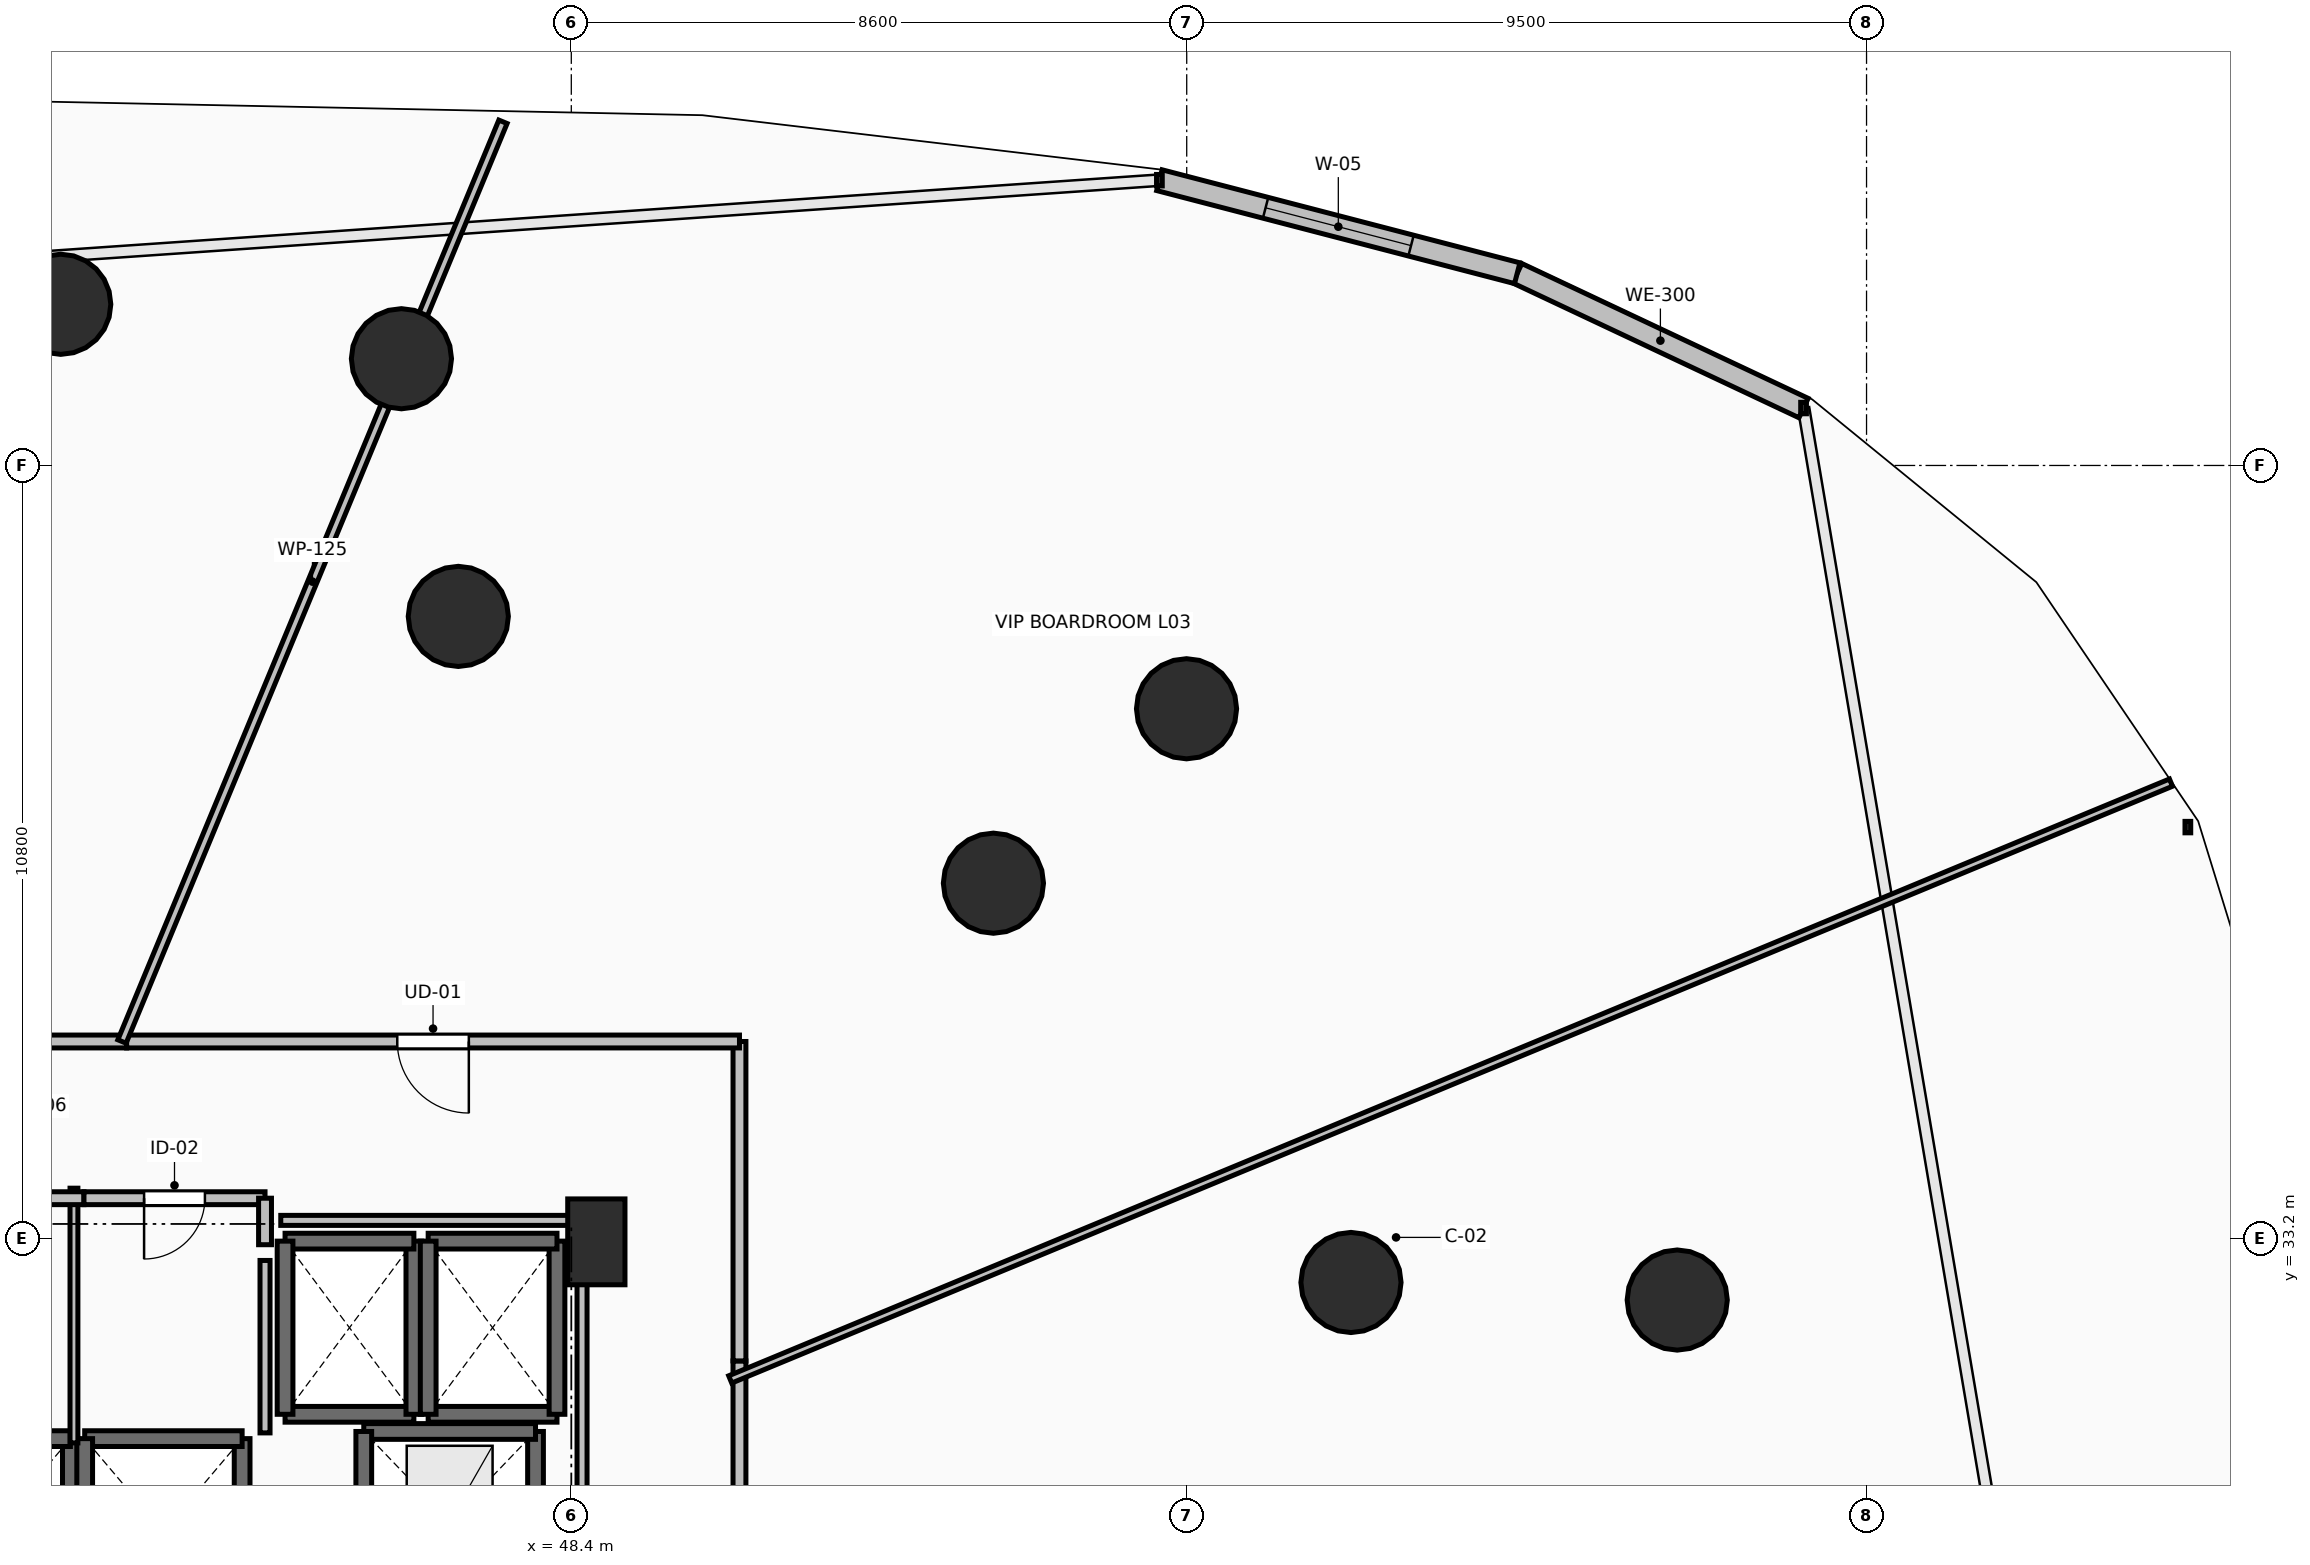
"""IFC4 building model, lengths in metres.
Left out: names, types, materials, properties, quantities, classifications, styles, units other than length and angle.
Written with IfcOpenShell. Run it as: python <this file> out.ifc"""

import sys

from ifc_helpers import new_model, si_unit, direction, frame, frame_2d, origin, origin_2d, place, context, subcontext, project, spatial, rectangle, circle, extrude, element, fill, save


model = new_model("IFC4")
c1 = context("Model", 3, precision=1e-05, world=origin(), true_north=direction((0.0, 1.0)))
c2 = subcontext(c1, "Body", "Model", "MODEL_VIEW")
j1 = project(units=[si_unit("LENGTHUNIT", "METRE"), si_unit("PLANEANGLEUNIT", "RADIAN")], contexts=[c1])
p1 = place(None, origin())
s1 = spatial("IfcSite", under=j1, at=p1, CompositionType="ELEMENT")
p2 = place(p1, origin())
s2 = spatial("IfcBuilding", under=s1, at=p2, CompositionType="ELEMENT")
p3 = place(p2, frame((0.0, 0.0, 14.4)))
s3 = spatial("IfcBuildingStorey", under=s2, at=p3, CompositionType="ELEMENT", Elevation=14.4)
for number, where, z_axis, x_axis in (
    (1, (59.295, 32.582, 0.0), (0.0, 0.0, 1.0), (0.924, 0.383, 0.0)),
    (2, (54.299, 38.162, 0.0), (0.0, 0.0, 1.0), (0.707, 0.707, 0.0)),
    (3, (46.821, 41.891, 0.0), (0.0, 0.0, 1.0), (0.383, 0.924, 0.0)),
    (4, (63.854, 32.337, 0.0), (0.0, 0.0, 1.0), (0.924, 0.383, 0.0)),
    (5, (56.997, 40.6, 0.0), (0.0, 0.0, 1.0), (0.707, 0.707, 0.0)),
    (6, (46.026, 45.492, 0.0), (0.0, 0.0, 1.0), (0.383, 0.924, 0.0)),
    (7, (41.265, 46.252, 0.0), (0.0, 0.0, 1.0), (0.0, 1.0, 0.0)),
):
    element("IfcColumn", number, at=place(p3, frame(where, z_axis=z_axis, x_axis=x_axis)), inside=s3, PredefinedType="COLUMN", context=c2, shape_type="SweptSolid", body=[
        extrude(circle(Radius=0.7, at=origin_2d()), origin(), (0.0, 0.0, 1.0), 4.8),
    ])
p4 = place(p3, frame((48.75, 33.15, 0.0), z_axis=(0.0, 0.0, 1.0), x_axis=(1.0, 0.0, 0.0)))
e8 = element("IfcColumn", 8, at=p4, inside=s3, PredefinedType="PILASTER", context=c2, shape_type="SweptSolid", body=[
    extrude(rectangle(XDim=0.8, YDim=1.2, at=origin_2d()), origin(), (0.0, 0.0, 1.0), 4.8),
])
p5 = place(p3, frame((65.62, 44.802, 0.0), z_axis=(0.0, 0.0, 1.0), x_axis=(-0.904701070817, 0.426046913452, 0.0)))
e9 = element("IfcWall", 9, at=p5, inside=s3, PredefinedType="STANDARD", context=c2, shape_type="SweptSolid", body=[
    extrude(rectangle(XDim=4.423, YDim=0.3, at=frame_2d((2.211, 0.0))), origin(), (0.0, 0.0, 1.0), 4.48),
])
p6 = place(p3, frame((61.619, 46.687, 0.0), z_axis=(0.0, 0.0, 1.0), x_axis=(-0.967814681155, 0.251663948434, 0.0)))
e10 = element("IfcWall", 10, at=p6, inside=s3, PredefinedType="STANDARD", context=c2, shape_type="SweptSolid", body=[
    extrude(rectangle(XDim=5.167, YDim=0.3, at=frame_2d((2.583, 0.0))), origin(), (0.0, 0.0, 1.0), 4.48),
])
p7 = place(p6, frame((1.533, 0.0, 0.85)))
e11 = element("IfcOpeningElement", 11, at=p7, cuts=e10, PredefinedType="OPENING", context=c2, shape_type="SweptSolid", body=[
    extrude(rectangle(XDim=2.1, YDim=2.8, at=frame_2d((1.05, 1.4))), frame((0.0, 0.165, 0.0), z_axis=(0.0, -1.0, 0.0), x_axis=(1.0, 0.0, 0.0)), (0.0, 0.0, 1.0), 0.33),
])
p8 = place(p3, frame((41.4, 27.8, 0.0), z_axis=(0.0, 0.0, 1.0), x_axis=(0.0, 1.0, 0.0)))
e12 = element("IfcWall", 12, at=p8, inside=s3, PredefinedType="SOLIDWALL", context=c2, shape_type="SweptSolid", body=[
    extrude(rectangle(XDim=2.6, YDim=0.22, at=frame_2d((1.3, 0.0))), origin(), (0.0, 0.0, 1.0), 4.48),
])
p9 = place(p3, frame((41.4, 30.4, 0.0), z_axis=(0.0, 0.0, 1.0), x_axis=(-1.0, 0.0, 0.0)))
e13 = element("IfcWall", 13, at=p9, inside=s3, PredefinedType="SOLIDWALL", context=c2, shape_type="SweptSolid", body=[
    extrude(rectangle(XDim=2.2, YDim=0.22, at=frame_2d((1.1, 0.0))), origin(), (0.0, 0.0, 1.0), 4.48),
])
p10 = place(p3, frame((43.8, 27.8, 0.0), z_axis=(0.0, 0.0, 1.0), x_axis=(0.0, 1.0, 0.0)))
e14 = element("IfcWall", 14, at=p10, inside=s3, PredefinedType="SOLIDWALL", context=c2, shape_type="SweptSolid", body=[
    extrude(rectangle(XDim=2.6, YDim=0.22, at=frame_2d((1.3, 0.0))), origin(), (0.0, 0.0, 1.0), 4.48),
])
p11 = place(p3, frame((43.8, 30.4, 0.0), z_axis=(0.0, 0.0, 1.0), x_axis=(-1.0, 0.0, 0.0)))
e15 = element("IfcWall", 15, at=p11, inside=s3, PredefinedType="SOLIDWALL", context=c2, shape_type="SweptSolid", body=[
    extrude(rectangle(XDim=2.2, YDim=0.22, at=frame_2d((1.1, 0.0))), origin(), (0.0, 0.0, 1.0), 4.48),
])
p12 = place(p3, frame((41.6, 30.4, 0.0), z_axis=(0.0, 0.0, 1.0), x_axis=(0.0, -1.0, 0.0)))
e16 = element("IfcWall", 16, at=p12, inside=s3, PredefinedType="SOLIDWALL", context=c2, shape_type="SweptSolid", body=[
    extrude(rectangle(XDim=2.6, YDim=0.22, at=frame_2d((1.3, 0.0))), origin(), (0.0, 0.0, 1.0), 4.48),
])
p13 = place(p3, frame((44.4, 30.74, 0.0), z_axis=(0.0, 0.0, 1.0), x_axis=(1.0, 0.0, 0.0)))
e17 = element("IfcWall", 17, at=p13, inside=s3, PredefinedType="SOLIDWALL", context=c2, shape_type="SweptSolid", body=[
    extrude(rectangle(XDim=1.8, YDim=0.22, at=frame_2d((0.9, 0.0))), origin(), (0.0, 0.0, 1.0), 4.48),
])
p14 = place(p3, frame((46.2, 30.74, 0.0), z_axis=(0.0, 0.0, 1.0), x_axis=(0.0, 1.0, 0.0)))
e18 = element("IfcWall", 18, at=p14, inside=s3, PredefinedType="SOLIDWALL", context=c2, shape_type="SweptSolid", body=[
    extrude(rectangle(XDim=2.42, YDim=0.22, at=frame_2d((1.21, 0.0))), origin(), (0.0, 0.0, 1.0), 4.48),
])
p15 = place(p3, frame((46.2, 33.16, 0.0), z_axis=(0.0, 0.0, 1.0), x_axis=(-1.0, 0.0, 0.0)))
e19 = element("IfcWall", 19, at=p15, inside=s3, PredefinedType="SOLIDWALL", context=c2, shape_type="SweptSolid", body=[
    extrude(rectangle(XDim=1.8, YDim=0.22, at=frame_2d((0.9, 0.0))), origin(), (0.0, 0.0, 1.0), 4.48),
])
p16 = place(p3, frame((44.4, 33.16, 0.0), z_axis=(0.0, 0.0, 1.0), x_axis=(0.0, -1.0, 0.0)))
e20 = element("IfcWall", 20, at=p16, inside=s3, PredefinedType="SOLIDWALL", context=c2, shape_type="SweptSolid", body=[
    extrude(rectangle(XDim=2.42, YDim=0.22, at=frame_2d((1.21, 0.0))), origin(), (0.0, 0.0, 1.0), 4.48),
])
p17 = place(p3, frame((46.4, 30.74, 0.0), z_axis=(0.0, 0.0, 1.0), x_axis=(1.0, 0.0, 0.0)))
e21 = element("IfcWall", 21, at=p17, inside=s3, PredefinedType="SOLIDWALL", context=c2, shape_type="SweptSolid", body=[
    extrude(rectangle(XDim=1.8, YDim=0.22, at=frame_2d((0.9, 0.0))), origin(), (0.0, 0.0, 1.0), 4.48),
])
p18 = place(p3, frame((48.2, 30.74, 0.0), z_axis=(0.0, 0.0, 1.0), x_axis=(0.0, 1.0, 0.0)))
e22 = element("IfcWall", 22, at=p18, inside=s3, PredefinedType="SOLIDWALL", context=c2, shape_type="SweptSolid", body=[
    extrude(rectangle(XDim=2.42, YDim=0.22, at=frame_2d((1.21, 0.0))), origin(), (0.0, 0.0, 1.0), 4.48),
])
p19 = place(p3, frame((48.2, 33.16, 0.0), z_axis=(0.0, 0.0, 1.0), x_axis=(-1.0, 0.0, 0.0)))
e23 = element("IfcWall", 23, at=p19, inside=s3, PredefinedType="SOLIDWALL", context=c2, shape_type="SweptSolid", body=[
    extrude(rectangle(XDim=1.8, YDim=0.22, at=frame_2d((0.9, 0.0))), origin(), (0.0, 0.0, 1.0), 4.48),
])
p20 = place(p3, frame((46.4, 33.16, 0.0), z_axis=(0.0, 0.0, 1.0), x_axis=(0.0, -1.0, 0.0)))
e24 = element("IfcWall", 24, at=p20, inside=s3, PredefinedType="SOLIDWALL", context=c2, shape_type="SweptSolid", body=[
    extrude(rectangle(XDim=2.42, YDim=0.22, at=frame_2d((1.21, 0.0))), origin(), (0.0, 0.0, 1.0), 4.48),
])
p21 = place(p3, frame((47.9, 28.0, 0.0), z_axis=(0.0, 0.0, 1.0), x_axis=(0.0, 1.0, 0.0)))
e25 = element("IfcWall", 25, at=p21, inside=s3, PredefinedType="SHEAR", context=c2, shape_type="SweptSolid", body=[
    extrude(rectangle(XDim=2.5, YDim=0.22, at=frame_2d((1.25, 0.0))), origin(), (0.0, 0.0, 1.0), 4.48),
])
p22 = place(p3, frame((47.9, 30.5, 0.0), z_axis=(0.0, 0.0, 1.0), x_axis=(-1.0, 0.0, 0.0)))
e26 = element("IfcWall", 26, at=p22, inside=s3, PredefinedType="SHEAR", context=c2, shape_type="SweptSolid", body=[
    extrude(rectangle(XDim=2.4, YDim=0.22, at=frame_2d((1.2, 0.0))), origin(), (0.0, 0.0, 1.0), 4.48),
])
p23 = place(p3, frame((45.5, 30.5, 0.0), z_axis=(0.0, 0.0, 1.0), x_axis=(0.0, -1.0, 0.0)))
e27 = element("IfcWall", 27, at=p23, inside=s3, PredefinedType="SHEAR", context=c2, shape_type="SweptSolid", body=[
    extrude(rectangle(XDim=2.5, YDim=0.22, at=frame_2d((1.25, 0.0))), origin(), (0.0, 0.0, 1.0), 4.48),
])
p24 = place(p3, frame((41.45, 30.34, 0.0), z_axis=(0.0, 0.0, 1.0), x_axis=(0.0, 1.0, 0.0)))
e28 = element("IfcWall", 28, at=p24, inside=s3, PredefinedType="PARTITIONING", context=c2, shape_type="SweptSolid", body=[
    extrude(rectangle(XDim=3.56, YDim=0.11, at=frame_2d((1.78, 0.0))), origin(), (0.0, 0.0, 1.0), 4.48),
])
p25 = place(p3, frame((41.59, 33.76, 0.0), z_axis=(0.0, 0.0, 1.0), x_axis=(-1.0, 0.0, 0.0)))
e29 = element("IfcWall", 29, at=p25, inside=s3, PredefinedType="PARTITIONING", context=c2, shape_type="SweptSolid", body=[
    extrude(rectangle(XDim=3.44, YDim=0.18, at=frame_2d((1.72, 0.0))), origin(), (0.0, 0.0, 1.0), 4.48),
])
p26 = place(p25, frame((1.295, 0.0, 0.0)))
e30 = element("IfcOpeningElement", 30, at=p26, cuts=e29, PredefinedType="OPENING", context=c2, shape_type="SweptSolid", body=[
    extrude(rectangle(XDim=0.85, YDim=2.1, at=frame_2d((0.425, 1.05))), frame((0.0, 0.105, 0.0), z_axis=(0.0, -1.0, 0.0), x_axis=(1.0, 0.0, 0.0)), (0.0, 0.0, 1.0), 0.21),
])
p27 = place(p3, frame((44.12, 33.76, 0.0), z_axis=(0.0, 0.0, 1.0), x_axis=(-1.0, 0.0, 0.0)))
e31 = element("IfcWall", 31, at=p27, inside=s3, PredefinedType="PARTITIONING", context=c2, shape_type="SweptSolid", body=[
    extrude(rectangle(XDim=2.53, YDim=0.18, at=frame_2d((1.265, 0.0))), origin(), (0.0, 0.0, 1.0), 4.48),
])
p28 = place(p27, frame((0.84, 0.0, 0.0)))
e32 = element("IfcOpeningElement", 32, at=p28, cuts=e31, PredefinedType="OPENING", context=c2, shape_type="SweptSolid", body=[
    extrude(rectangle(XDim=0.85, YDim=2.1, at=frame_2d((0.425, 1.05))), frame((0.0, 0.105, 0.0), z_axis=(0.0, -1.0, 0.0), x_axis=(1.0, 0.0, 0.0)), (0.0, 0.0, 1.0), 0.21),
])
p29 = place(p3, frame((44.12, 33.11, 0.0), z_axis=(0.0, 0.0, 1.0), x_axis=(0.0, 1.0, 0.0)))
e33 = element("IfcWall", 33, at=p29, inside=s3, PredefinedType="PARTITIONING", context=c2, shape_type="SweptSolid", body=[
    extrude(rectangle(XDim=0.65, YDim=0.18, at=frame_2d((0.325, 0.0))), origin(), (0.0, 0.0, 1.0), 4.48),
])
p30 = place(p3, frame((42.186, 35.95, 0.0), z_axis=(0.0, 0.0, 1.0), x_axis=(-1.0, 0.0, 0.0)))
e34 = element("IfcWall", 34, at=p30, inside=s3, PredefinedType="PARTITIONING", context=c2, shape_type="SweptSolid", body=[
    extrude(rectangle(XDim=16.936, YDim=0.18, at=frame_2d((8.468, 0.0))), origin(), (0.0, 0.0, 1.0), 3.672),
])
p31 = place(p30, frame((7.868, 0.0, 0.0)))
e35 = element("IfcOpeningElement", 35, at=p31, cuts=e34, PredefinedType="OPENING", context=c2, shape_type="SweptSolid", body=[
    extrude(rectangle(XDim=1.2, YDim=2.15, at=frame_2d((0.6, 1.075))), frame((0.0, 0.105, 0.0), z_axis=(0.0, -1.0, 0.0), x_axis=(1.0, 0.0, 0.0)), (0.0, 0.0, 1.0), 0.21),
])
p32 = place(p3, frame((50.75, 13.96, 0.0), z_axis=(0.0, 0.0, 1.0), x_axis=(0.0, 1.0, 0.0)))
e36 = element("IfcWall", 36, at=p32, inside=s3, PredefinedType="PARTITIONING", context=c2, shape_type="SweptSolid", body=[
    extrude(rectangle(XDim=17.526, YDim=0.18, at=frame_2d((8.763, 0.0))), origin(), (0.0, 0.0, 1.0), 3.672),
])
p33 = place(p32, frame((8.263, 0.0, 0.0)))
e37 = element("IfcOpeningElement", 37, at=p33, cuts=e36, PredefinedType="OPENING", context=c2, shape_type="SweptSolid", body=[
    extrude(rectangle(XDim=1.0, YDim=2.15, at=frame_2d((0.5, 1.075))), frame((0.0, 0.105, 0.0), z_axis=(0.0, -1.0, 0.0), x_axis=(1.0, 0.0, 0.0)), (0.0, 0.0, 1.0), 0.21),
])
p34 = place(p3, frame((50.75, 31.486, 0.0), z_axis=(0.0, 0.0, 1.0), x_axis=(0.0, 1.0, 0.0)))
e38 = element("IfcWall", 38, at=p34, inside=s3, PredefinedType="PARTITIONING", context=c2, shape_type="SweptSolid", body=[
    extrude(rectangle(XDim=4.464, YDim=0.18, at=frame_2d((2.232, 0.0))), origin(), (0.0, 0.0, 1.0), 3.672),
])
p35 = place(p3, frame((50.75, 35.95, 0.0), z_axis=(0.0, 0.0, 1.0), x_axis=(-1.0, 0.0, 0.0)))
e39 = element("IfcWall", 39, at=p35, inside=s3, PredefinedType="PARTITIONING", context=c2, shape_type="SweptSolid", body=[
    extrude(rectangle(XDim=8.564, YDim=0.18, at=frame_2d((4.282, 0.0))), origin(), (0.0, 0.0, 1.0), 3.672),
])
p36 = place(p35, frame((3.782, 0.0, 0.0)))
e40 = element("IfcOpeningElement", 40, at=p36, cuts=e39, PredefinedType="OPENING", context=c2, shape_type="SweptSolid", body=[
    extrude(rectangle(XDim=1.0, YDim=2.15, at=frame_2d((0.5, 1.075))), frame((0.0, 0.105, 0.0), z_axis=(0.0, -1.0, 0.0), x_axis=(1.0, 0.0, 0.0)), (0.0, 0.0, 1.0), 0.21),
])
p37 = place(p3, frame((42.121, 35.95, 0.0), z_axis=(0.0, 0.0, 1.0), x_axis=(0.382688117688, 0.923877591773, 0.0)))
e41 = element("IfcWall", 41, at=p37, inside=s3, PredefinedType="PARTITIONING", context=c2, shape_type="SweptSolid", body=[
    extrude(rectangle(XDim=13.912, YDim=0.125, at=frame_2d((6.956, 0.0))), origin(), (0.0, 0.0, 1.0), 4.114),
])
p38 = place(p3, frame((70.754, 39.568, 0.0), z_axis=(0.0, 0.0, 1.0), x_axis=(-0.923869091814, -0.382708637466, 0.0)))
e42 = element("IfcWall", 42, at=p38, inside=s3, PredefinedType="PARTITIONING", context=c2, shape_type="SweptSolid", body=[
    extrude(rectangle(XDim=21.793, YDim=0.11, at=frame_2d((10.896, 0.0))), origin(), (0.0, 0.0, 1.0), 3.672),
])
p39 = place(p3, frame((44.12, 30.48, 0.0), z_axis=(0.0, 0.0, 1.0), x_axis=(0.0, 1.0, 0.0)))
e43 = element("IfcWall", 43, at=p39, inside=s3, PredefinedType="PARTITIONING", context=c2, shape_type="SweptSolid", body=[
    extrude(rectangle(XDim=2.41, YDim=0.14, at=frame_2d((1.205, 0.0))), origin(), (0.0, 0.0, 1.0), 4.48),
])
p40 = place(p3, frame((44.34, 33.45, 0.0), z_axis=(0.0, 0.0, 1.0), x_axis=(1.0, 0.0, 0.0)))
e44 = element("IfcWall", 44, at=p40, inside=s3, PredefinedType="PARTITIONING", context=c2, shape_type="SweptSolid", body=[
    extrude(rectangle(XDim=4.21, YDim=0.14, at=frame_2d((2.105, 0.0))), origin(), (0.0, 0.0, 1.0), 3.672),
])
p41 = place(p3, frame((48.55, 33.45, 0.0), z_axis=(0.0, 0.0, 1.0), x_axis=(0.0, -1.0, 0.0)))
e45 = element("IfcWall", 45, at=p41, inside=s3, PredefinedType="PARTITIONING", context=c2, shape_type="SweptSolid", body=[
    extrude(rectangle(XDim=5.254, YDim=0.14, at=frame_2d((2.627, 0.0))), origin(), (0.0, 0.0, 1.0), 3.672),
])
p42 = place(p7, origin())
e46 = element("IfcWindow", 46, at=p42, inside=s3, PartitioningType="SINGLE_PANEL", PredefinedType="WINDOW", context=c2, shape_type="SweptSolid", body=[
    extrude(rectangle(XDim=2.1, YDim=2.8, at=frame_2d((1.05, 1.4))), frame((0.0, 0.03, 0.0), z_axis=(0.0, -1.0, 0.0), x_axis=(1.0, 0.0, 0.0)), (0.0, 0.0, 1.0), 0.06),
])
fill(e11, e46)
p43 = place(p28, origin())
e47 = element("IfcDoor", 47, at=p43, inside=s3, OperationType="SINGLE_SWING_RIGHT", PredefinedType="DOOR", context=c2, shape_type="SweptSolid", body=[
    extrude(rectangle(XDim=0.85, YDim=2.1, at=frame_2d((0.425, 1.05))), frame((0.0, 0.025, 0.0), z_axis=(0.0, -1.0, 0.0), x_axis=(1.0, 0.0, 0.0)), (0.0, 0.0, 1.0), 0.05),
])
fill(e32, e47)
p44 = place(p36, origin())
e48 = element("IfcDoor", 48, at=p44, inside=s3, OperationType="SINGLE_SWING_LEFT", PredefinedType="DOOR", context=c2, shape_type="SweptSolid", body=[
    extrude(rectangle(XDim=1.0, YDim=2.15, at=frame_2d((0.5, 1.075))), frame((0.0, 0.025, 0.0), z_axis=(0.0, -1.0, 0.0), x_axis=(1.0, 0.0, 0.0)), (0.0, 0.0, 1.0), 0.05),
])
fill(e40, e48)
save(model, sys.argv[1])
